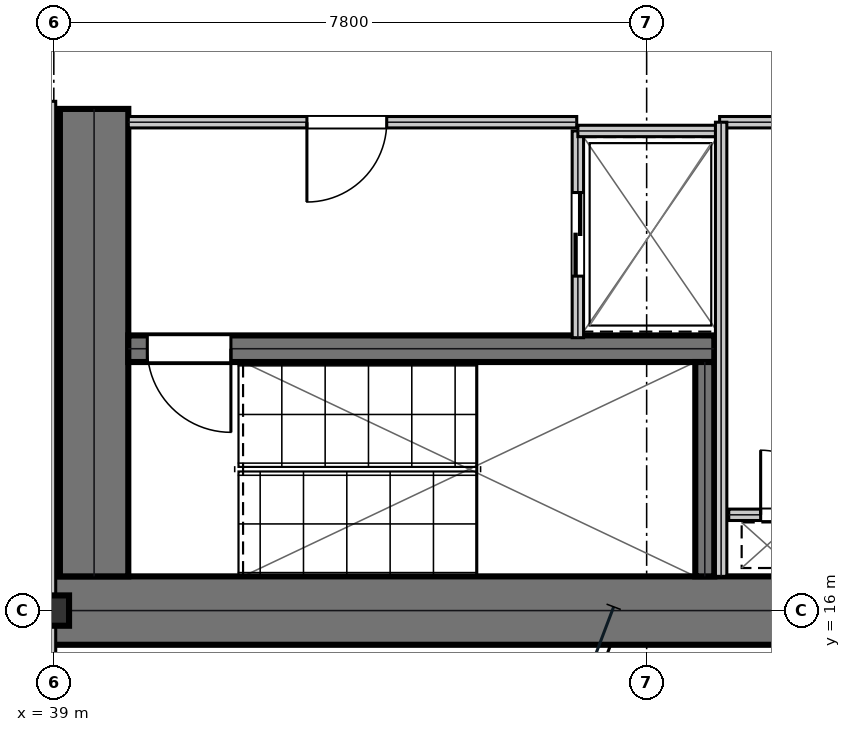
"""IFC4 building model, lengths in metres.
Left out: names, types, materials, properties, quantities, classifications, styles, units other than length and angle.
Written with IfcOpenShell. Run it as: python <this file> out.ifc"""

import sys

from ifc_helpers import new_model, si_unit, direction, frame, frame_2d, origin, origin_2d, place, context, subcontext, project, spatial, rectangle, i_section, extrude, element, fill, save


model = new_model("IFC4")
c1 = context("Model", 3, precision=1e-05, world=origin(), true_north=direction((0.0, 1.0)))
c2 = subcontext(c1, "Body", "Model", "MODEL_VIEW")
j1 = project(units=[si_unit("LENGTHUNIT", "METRE"), si_unit("PLANEANGLEUNIT", "RADIAN")], contexts=[c1])
p1 = place(None, origin())
s1 = spatial("IfcSite", under=j1, at=p1, CompositionType="ELEMENT")
p2 = place(p1, origin())
s2 = spatial("IfcBuilding", under=s1, at=p2, CompositionType="ELEMENT")
p3 = place(p2, frame((0.0, 0.0, 37.8)))
s3 = spatial("IfcBuildingStorey", under=s2, at=p3, CompositionType="ELEMENT", Elevation=37.8)
p4 = place(p3, frame((38.8, 16.0, 0.0), z_axis=(0.0, 0.0, 1.0), x_axis=(1.0, 0.0, 0.0)))
e1 = element("IfcWall", 1, at=p4, inside=s3, PredefinedType="SHEAR", context=c2, shape_type="SweptSolid", body=[
    extrude(rectangle(XDim=16.0, YDim=0.9, at=frame_2d((8.0, 0.0))), origin(), (0.0, 0.0, 1.0), 3.81),
])
p5 = place(p3, frame((39.53, 16.45, 0.0), z_axis=(0.0, 0.0, 1.0), x_axis=(0.0, 1.0, 0.0)))
e2 = element("IfcWall", 2, at=p5, inside=s3, PredefinedType="SHEAR", context=c2, shape_type="SweptSolid", body=[
    extrude(rectangle(XDim=6.15, YDim=0.9, at=frame_2d((3.075, 0.0))), origin(), (0.0, 0.0, 1.0), 3.81),
])
p6 = place(p3, frame((39.98, 19.445, 0.0), z_axis=(0.0, 0.0, 1.0), x_axis=(1.0, 0.0, 0.0)))
e3 = element("IfcWall", 3, at=p6, inside=s3, PredefinedType="SHEAR", context=c2, shape_type="SweptSolid", body=[
    extrude(rectangle(XDim=7.71, YDim=0.35, at=frame_2d((3.855, 0.0))), origin(), (0.0, 0.0, 1.0), 3.81),
])
p7 = place(p6, frame((0.25, 0.0, 0.0)))
e4 = element("IfcOpeningElement", 4, at=p7, cuts=e3, PredefinedType="OPENING", context=c2, shape_type="SweptSolid", body=[
    extrude(rectangle(XDim=1.1, YDim=2.15, at=frame_2d((0.55, 1.075))), frame((0.0, 0.185, 0.0), z_axis=(0.0, -1.0, 0.0), x_axis=(1.0, 0.0, 0.0)), (0.0, 0.0, 1.0), 0.37),
])
p8 = place(p3, frame((47.565, 16.45, 0.0), z_axis=(0.0, 0.0, 1.0), x_axis=(0.0, 1.0, 0.0)))
e5 = element("IfcWall", 5, at=p8, inside=s3, PredefinedType="SHEAR", context=c2, shape_type="SweptSolid", body=[
    extrude(rectangle(XDim=2.82, YDim=0.25, at=frame_2d((1.41, 0.0))), origin(), (0.0, 0.0, 1.0), 3.81),
])
p9 = place(p3, frame((39.0, 16.0, 0.0), z_axis=(0.0, 0.0, 1.0), x_axis=(1.0, 0.0, 0.0)))
e6 = element("IfcColumn", 6, at=p9, inside=s3, PredefinedType="COLUMN", context=c2, shape_type="SweptSolid", body=[
    extrude(i_section(OverallWidth=0.401, OverallDepth=0.399, WebThickness=0.025, FlangeThickness=0.04, at=origin_2d()), origin(), (0.0, 0.0, 1.0), 4.044),
])
p10 = place(p3, frame((39.98, 22.425, 0.0), z_axis=(0.0, 0.0, 1.0), x_axis=(1.0, 0.0, 0.0)))
e7 = element("IfcWall", 7, at=p10, inside=s3, PredefinedType="PARTITIONING", context=c2, shape_type="SweptSolid", body=[
    extrude(rectangle(XDim=5.9, YDim=0.15, at=frame_2d((2.95, 0.0))), origin(), (0.0, 0.0, 1.0), 3.81),
])
p11 = place(p10, frame((2.35, 0.0, 0.0)))
e8 = element("IfcOpeningElement", 8, at=p11, cuts=e7, PredefinedType="OPENING", context=c2, shape_type="SweptSolid", body=[
    extrude(rectangle(XDim=1.05, YDim=2.15, at=frame_2d((0.525, 1.075))), frame((0.0, 0.085, 0.0), z_axis=(0.0, -1.0, 0.0), x_axis=(1.0, 0.0, 0.0)), (0.0, 0.0, 1.0), 0.17),
])
p12 = place(p3, frame((45.895, 19.59, 0.0), z_axis=(0.0, 0.0, 1.0), x_axis=(0.0, 1.0, 0.0)))
e9 = element("IfcWall", 9, at=p12, inside=s3, PredefinedType="PARTITIONING", context=c2, shape_type="SweptSolid", body=[
    extrude(rectangle(XDim=2.72, YDim=0.15, at=frame_2d((1.36, 0.0))), origin(), (0.0, 0.0, 1.0), 3.81),
])
p13 = place(p12, frame((0.81, 0.0, 0.0)))
e10 = element("IfcOpeningElement", 10, at=p13, cuts=e9, PredefinedType="OPENING", context=c2, shape_type="SweptSolid", body=[
    extrude(rectangle(XDim=1.1, YDim=2.15, at=frame_2d((0.55, 1.075))), frame((0.0, 0.085, 0.0), z_axis=(0.0, -1.0, 0.0), x_axis=(1.0, 0.0, 0.0)), (0.0, 0.0, 1.0), 0.17),
])
p14 = place(p3, frame((45.895, 22.31, 0.0), z_axis=(0.0, 0.0, 1.0), x_axis=(1.0, 0.0, 0.0)))
e11 = element("IfcWall", 11, at=p14, inside=s3, PredefinedType="PARTITIONING", context=c2, shape_type="SweptSolid", body=[
    extrude(rectangle(XDim=1.915, YDim=0.15, at=frame_2d((0.958, 0.0))), origin(), (0.0, 0.0, 1.0), 3.81),
])
p15 = place(p3, frame((47.88, 17.26, 0.0), z_axis=(0.0, 0.0, 1.0), x_axis=(1.0, 0.0, 0.0)))
e12 = element("IfcWall", 12, at=p15, inside=s3, PredefinedType="PARTITIONING", context=c2, shape_type="SweptSolid", body=[
    extrude(rectangle(XDim=1.72, YDim=0.15, at=frame_2d((0.86, 0.0))), origin(), (0.0, 0.0, 1.0), 3.81),
])
p16 = place(p15, frame((0.42, 0.0, 0.0)))
e13 = element("IfcOpeningElement", 13, at=p16, cuts=e12, PredefinedType="OPENING", context=c2, shape_type="SweptSolid", body=[
    extrude(rectangle(XDim=0.85, YDim=2.15, at=frame_2d((0.425, 1.075))), frame((0.0, 0.085, 0.0), z_axis=(0.0, -1.0, 0.0), x_axis=(1.0, 0.0, 0.0)), (0.0, 0.0, 1.0), 0.17),
])
p17 = place(p3, frame((47.76, 22.425, 0.0), z_axis=(0.0, 0.0, 1.0), x_axis=(1.0, 0.0, 0.0)))
e14 = element("IfcWall", 14, at=p17, inside=s3, PredefinedType="PARTITIONING", context=c2, shape_type="SweptSolid", body=[
    extrude(rectangle(XDim=1.96, YDim=0.15, at=frame_2d((0.98, 0.0))), origin(), (0.0, 0.0, 1.0), 3.81),
])
p18 = place(p3, frame((47.78, 16.45, 0.0), z_axis=(0.0, 0.0, 1.0), x_axis=(0.0, 1.0, 0.0)))
e15 = element("IfcWall", 15, at=p18, inside=s3, PredefinedType="PARTITIONING", context=c2, shape_type="SweptSolid", body=[
    extrude(rectangle(XDim=5.975, YDim=0.15, at=frame_2d((2.988, 0.0))), origin(), (0.0, 0.0, 1.0), 3.81),
])
p19 = place(p3, frame((38.95, 14.5, 0.0), z_axis=(0.0, 0.0, 1.0), x_axis=(0.0, 1.0, 0.0)))
e16 = element("IfcWall", 16, at=p19, inside=s3, PredefinedType="PARTITIONING", context=c2, shape_type="SweptSolid", body=[
    extrude(rectangle(XDim=8.2, YDim=0.15, at=frame_2d((4.1, 0.0))), origin(), (0.0, 0.0, 1.0), 3.181),
])
p20 = place(p11, frame((1.05, 0.0, 0.0), z_axis=(0.0, 0.0, 1.0), x_axis=(-1.0, 0.0, 0.0)))
e17 = element("IfcDoor", 17, at=p20, inside=s3, OperationType="SINGLE_SWING_RIGHT", PredefinedType="DOOR", context=c2, shape_type="SweptSolid", body=[
    extrude(rectangle(XDim=1.05, YDim=2.15, at=frame_2d((0.525, 1.075))), frame((0.0, 0.025, 0.0), z_axis=(0.0, -1.0, 0.0), x_axis=(1.0, 0.0, 0.0)), (0.0, 0.0, 1.0), 0.05),
])
fill(e8, e17)
p21 = place(p13, frame((1.1, 0.0, 0.0), z_axis=(0.0, 0.0, 1.0), x_axis=(-1.0, 0.0, 0.0)))
e18 = element("IfcDoor", 18, at=p21, inside=s3, OperationType="DOUBLE_DOOR_SLIDING", PredefinedType="DOOR", context=c2, shape_type="SweptSolid", body=[
    extrude(rectangle(XDim=1.1, YDim=2.15, at=frame_2d((0.55, 1.075))), frame((0.0, 0.025, 0.0), z_axis=(0.0, -1.0, 0.0), x_axis=(1.0, 0.0, 0.0)), (0.0, 0.0, 1.0), 0.05),
])
fill(e10, e18)
p22 = place(p16, origin())
e19 = element("IfcDoor", 19, at=p22, inside=s3, OperationType="SINGLE_SWING_LEFT", PredefinedType="TRAPDOOR", context=c2, shape_type="SweptSolid", body=[
    extrude(rectangle(XDim=0.85, YDim=2.15, at=frame_2d((0.425, 1.075))), frame((0.0, 0.025, 0.0), z_axis=(0.0, -1.0, 0.0), x_axis=(1.0, 0.0, 0.0)), (0.0, 0.0, 1.0), 0.05),
])
fill(e13, e19)
p23 = place(p7, frame((1.1, 0.0, 0.0), z_axis=(0.0, 0.0, 1.0), x_axis=(-1.0, 0.0, 0.0)))
e20 = element("IfcDoor", 20, at=p23, inside=s3, OperationType="SINGLE_SWING_LEFT", PredefinedType="DOOR", context=c2, shape_type="SweptSolid", body=[
    extrude(rectangle(XDim=1.1, YDim=2.15, at=frame_2d((0.55, 1.075))), frame((0.0, 0.025, 0.0), z_axis=(0.0, -1.0, 0.0), x_axis=(1.0, 0.0, 0.0)), (0.0, 0.0, 1.0), 0.05),
])
fill(e4, e20)
save(model, sys.argv[1])
